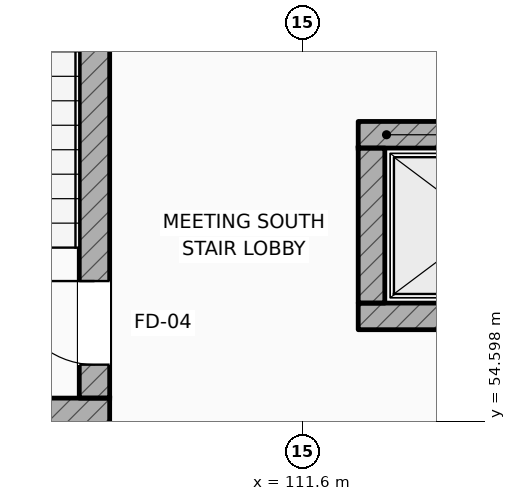
"""IFC4 building model, lengths in metres.
Left out: names, types, materials, properties, quantities, classifications, styles, units other than length and angle.
Written with IfcOpenShell. Run it as: python <this file> out.ifc"""

import sys

from ifc_helpers import new_model, si_unit, direction, frame, frame_2d, origin, place, context, subcontext, project, spatial, rectangle, extrude, element, fill, save


model = new_model("IFC4")
c1 = context("Model", 3, precision=1e-05, world=origin(), true_north=direction((0.0, 1.0)))
c2 = subcontext(c1, "Body", "Model", "MODEL_VIEW")
j1 = project(units=[si_unit("LENGTHUNIT", "METRE"), si_unit("PLANEANGLEUNIT", "RADIAN")], contexts=[c1])
p1 = place(None, origin())
s1 = spatial("IfcSite", under=j1, at=p1, CompositionType="ELEMENT")
p2 = place(p1, origin())
s2 = spatial("IfcBuilding", under=s1, at=p2, CompositionType="ELEMENT")
p3 = place(p2, frame((0.0, 0.0, 11.4)))
s3 = spatial("IfcBuildingStorey", under=s2, at=p3, CompositionType="ELEMENT", Elevation=11.4)
p4 = place(p3, frame((104.1, 54.7, 0.0), z_axis=(0.0, 0.0, 1.0), x_axis=(1.0, 0.0, 0.0)))
e1 = element("IfcWall", 1, at=p4, inside=s3, PredefinedType="SHEAR", context=c2, shape_type="SweptSolid", body=[
    extrude(rectangle(XDim=4.96, YDim=0.4, at=frame_2d((2.48, 0.0))), origin(), (0.0, 0.0, 1.0), 4.8),
])
p5 = place(p3, frame((108.86, 54.9, 0.0), z_axis=(0.0, 0.0, 1.0), x_axis=(0.0, 1.0, 0.0)))
e2 = element("IfcWall", 2, at=p5, inside=s3, PredefinedType="SHEAR", context=c2, shape_type="SweptSolid", body=[
    extrude(rectangle(XDim=9.112, YDim=0.4, at=frame_2d((4.556, 0.0))), origin(), (0.0, 0.0, 1.0), 4.8),
])
p6 = place(p5, frame((0.44, 0.0, 0.0)))
e3 = element("IfcOpeningElement", 3, at=p6, cuts=e2, PredefinedType="OPENING", context=c2, shape_type="SweptSolid", body=[
    extrude(rectangle(XDim=1.1, YDim=2.2, at=frame_2d((0.55, 1.1))), frame((0.0, 0.21, 0.0), z_axis=(0.0, -1.0, 0.0), x_axis=(1.0, 0.0, 0.0)), (0.0, 0.0, 1.0), 0.42),
])
p7 = place(p3, frame((112.33, 58.365, 0.0), z_axis=(0.0, 0.0, 1.0), x_axis=(1.0, 0.0, 0.0)))
e4 = element("IfcWall", 4, at=p7, inside=s3, PredefinedType="SHEAR", context=c2, shape_type="SweptSolid", body=[
    extrude(rectangle(XDim=3.34, YDim=0.35, at=frame_2d((1.67, 0.0))), origin(), (0.0, 0.0, 1.0), 4.52),
])
p8 = place(p7, frame((1.045, 0.0, 0.0)))
e5 = element("IfcOpeningElement", 5, at=p8, cuts=e4, PredefinedType="OPENING", context=c2, shape_type="SweptSolid", body=[
    extrude(rectangle(XDim=1.25, YDim=2.25, at=frame_2d((0.625, 1.125))), frame((0.0, 0.185, 0.0), z_axis=(0.0, -1.0, 0.0), x_axis=(1.0, 0.0, 0.0)), (0.0, 0.0, 1.0), 0.37),
])
p9 = place(p3, frame((112.33, 55.975, 0.0), z_axis=(0.0, 0.0, 1.0), x_axis=(1.0, 0.0, 0.0)))
e6 = element("IfcWall", 6, at=p9, inside=s3, PredefinedType="SHEAR", context=c2, shape_type="SweptSolid", body=[
    extrude(rectangle(XDim=3.34, YDim=0.35, at=frame_2d((1.67, 0.0))), origin(), (0.0, 0.0, 1.0), 4.52),
])
p10 = place(p3, frame((112.505, 56.15, 0.0), z_axis=(0.0, 0.0, 1.0), x_axis=(0.0, 1.0, 0.0)))
e7 = element("IfcWall", 7, at=p10, inside=s3, PredefinedType="SHEAR", context=c2, shape_type="SweptSolid", body=[
    extrude(rectangle(XDim=2.04, YDim=0.35, at=frame_2d((1.02, 0.0))), origin(), (0.0, 0.0, 1.0), 4.52),
])
p11 = place(p6, origin())
e8 = element("IfcDoor", 8, at=p11, inside=s3, OperationType="SINGLE_SWING_RIGHT", PredefinedType="DOOR", context=c2, shape_type="SweptSolid", body=[
    extrude(rectangle(XDim=1.1, YDim=2.2, at=frame_2d((0.55, 1.1))), frame((0.0, 0.025, 0.0), z_axis=(0.0, -1.0, 0.0), x_axis=(1.0, 0.0, 0.0)), (0.0, 0.0, 1.0), 0.05),
])
fill(e3, e8)
save(model, sys.argv[1])
